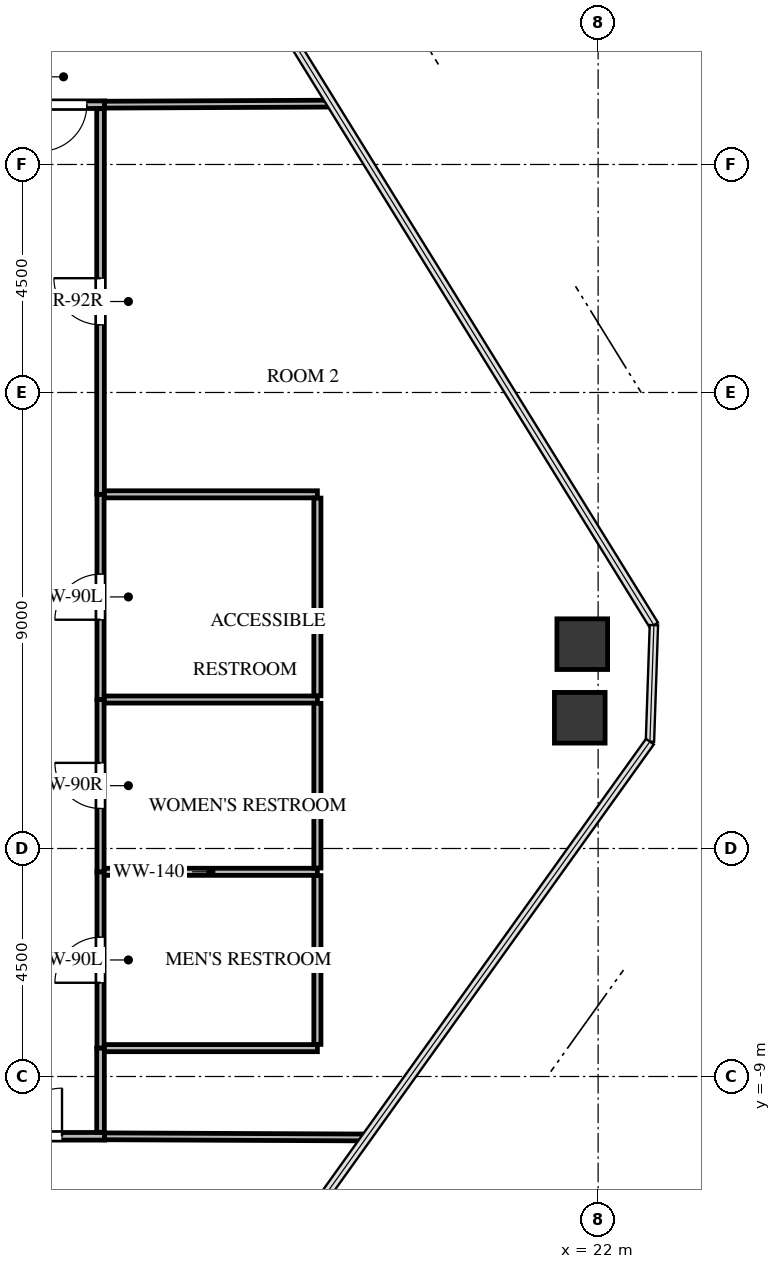
"""IFC4 building model, lengths in metres.
Left out: names, types, materials, properties, quantities, classifications, styles, units other than length and angle.
Written with IfcOpenShell. Run it as: python <this file> out.ifc"""

import sys

from ifc_helpers import new_model, si_unit, direction, frame, frame_2d, origin, origin_2d, place, context, subcontext, project, spatial, rectangle, extrude, source, transform, mapped, element, fill, save


model = new_model("IFC4")
c1 = context("Model", 3, precision=1e-05, world=origin(), true_north=direction((0.0, 1.0)))
c2 = subcontext(c1, "Body", "Model", "MODEL_VIEW")
j1 = project(units=[si_unit("LENGTHUNIT", "METRE"), si_unit("PLANEANGLEUNIT", "RADIAN")], contexts=[c1])
p1 = place(None, origin())
s1 = spatial("IfcSite", under=j1, at=p1, CompositionType="ELEMENT")
p2 = place(p1, origin())
s2 = spatial("IfcBuilding", under=s1, at=p2, CompositionType="ELEMENT")
p3 = place(p2, frame((0.0, 0.0, 190.3)))
s3 = spatial("IfcBuildingStorey", under=s2, at=p3, CompositionType="ELEMENT", Elevation=190.3)
m1 = source(origin(), c2, "Body", "SweptSolid", [
    extrude(rectangle(XDim=1.0, YDim=1.0, at=origin_2d()), origin(), (0.0, 0.0, 1.0), 3.3),
])
for number, where, z_axis, x_axis in (
    (1, (21.687, -0.467, -0.24), (0.0, 0.0, 1.0), (1.0, 0.0, 0.0)),
    (2, (21.638, -1.92, -0.24), (0.0, 0.0, 1.0), (1.0, 0.0, 0.0)),
):
    element("IfcColumn", number, at=place(p3, frame(where, z_axis=z_axis, x_axis=x_axis)), inside=s3, PredefinedType="COLUMN", context=c2, shape_type="MappedRepresentation", body=[
        mapped(m1, transform((0.0, 0.0, 0.0), x_axis=(1.0, 0.0, 0.0), y_axis=(0.0, 1.0, 0.0), z_axis=(0.0, 0.0, 1.0), scale=1.0)),
    ])
p4 = place(p3, frame((12.18, -8.44, 0.0), z_axis=(0.0, 0.0, 1.0), x_axis=(0.0, 1.0, 0.0)))
e3 = element("IfcWall", 3, at=p4, inside=s3, PredefinedType="PARTITIONING", context=c2, shape_type="SweptSolid", body=[
    extrude(rectangle(XDim=3.48, YDim=0.14, at=frame_2d((1.74, 0.0))), origin(), (0.0, 0.0, 1.0), 3.045),
])
p5 = place(p4, frame((1.29, 0.0, 0.0)))
e4 = element("IfcOpeningElement", 4, at=p5, cuts=e3, PredefinedType="OPENING", context=c2, shape_type="SweptSolid", body=[
    extrude(rectangle(XDim=0.9, YDim=2.05, at=frame_2d((0.45, 1.025))), frame((0.0, 0.08, 0.0), z_axis=(0.0, -1.0, 0.0), x_axis=(1.0, 0.0, 0.0)), (0.0, 0.0, 1.0), 0.16),
])
p6 = place(p3, frame((12.18, -4.96, 0.0), z_axis=(0.0, 0.0, 1.0), x_axis=(0.0, 1.0, 0.0)))
e5 = element("IfcWall", 5, at=p6, inside=s3, PredefinedType="PARTITIONING", context=c2, shape_type="SweptSolid", body=[
    extrude(rectangle(XDim=3.4, YDim=0.14, at=frame_2d((1.7, 0.0))), origin(), (0.0, 0.0, 1.0), 3.045),
])
p7 = place(p6, frame((1.25, 0.0, 0.0)))
e6 = element("IfcOpeningElement", 6, at=p7, cuts=e5, PredefinedType="OPENING", context=c2, shape_type="SweptSolid", body=[
    extrude(rectangle(XDim=0.9, YDim=2.05, at=frame_2d((0.45, 1.025))), frame((0.0, 0.08, 0.0), z_axis=(0.0, -1.0, 0.0), x_axis=(1.0, 0.0, 0.0)), (0.0, 0.0, 1.0), 0.16),
])
p8 = place(p3, frame((12.18, -1.56, 0.0), z_axis=(0.0, 0.0, 1.0), x_axis=(0.0, 1.0, 0.0)))
e7 = element("IfcWall", 7, at=p8, inside=s3, PredefinedType="PARTITIONING", context=c2, shape_type="SweptSolid", body=[
    extrude(rectangle(XDim=4.05, YDim=0.14, at=frame_2d((2.025, 0.0))), origin(), (0.0, 0.0, 1.0), 2.242),
])
p9 = place(p8, frame((1.575, 0.0, 0.0)))
e8 = element("IfcOpeningElement", 8, at=p9, cuts=e7, PredefinedType="OPENING", context=c2, shape_type="SweptSolid", body=[
    extrude(rectangle(XDim=0.9, YDim=2.05, at=frame_2d((0.45, 1.025))), frame((0.0, 0.08, 0.0), z_axis=(0.0, -1.0, 0.0), x_axis=(1.0, 0.0, 0.0)), (0.0, 0.0, 1.0), 0.16),
])
p10 = place(p3, frame((12.26, 10.18, 0.0), z_axis=(0.0, 0.0, 1.0), x_axis=(-1.0, 0.0, 0.0)))
e9 = element("IfcWall", 9, at=p10, inside=s3, PredefinedType="PARTITIONING", context=c2, shape_type="SweptSolid", body=[
    extrude(rectangle(XDim=6.72, YDim=0.15, at=frame_2d((3.36, 0.0))), origin(), (0.0, 0.0, 1.0), 2.242),
])
p11 = place(p10, frame((0.35, 0.0, 0.0)))
e10 = element("IfcOpeningElement", 10, at=p11, cuts=e9, PredefinedType="OPENING", context=c2, shape_type="SweptSolid", body=[
    extrude(rectangle(XDim=0.92, YDim=2.1, at=frame_2d((0.46, 1.05))), frame((0.0, 0.085, 0.0), z_axis=(0.0, -1.0, 0.0), x_axis=(1.0, 0.0, 0.0)), (0.0, 0.0, 1.0), 0.17),
])
p12 = place(p3, frame((9.04, -10.18, 0.0), z_axis=(0.0, 0.0, 1.0), x_axis=(1.0, 0.0, 0.0)))
e11 = element("IfcWall", 11, at=p12, inside=s3, PredefinedType="PARTITIONING", context=c2, shape_type="SweptSolid", body=[
    extrude(rectangle(XDim=3.22, YDim=0.15, at=frame_2d((1.61, 0.0))), origin(), (0.0, 0.0, 1.0), 3.045),
])
p13 = place(p12, frame((1.43, 0.0, 0.0)))
e12 = element("IfcOpeningElement", 12, at=p13, cuts=e11, PredefinedType="OPENING", context=c2, shape_type="SweptSolid", body=[
    extrude(rectangle(XDim=0.95, YDim=2.1, at=frame_2d((0.475, 1.05))), frame((0.0, 0.085, 0.0), z_axis=(0.0, -1.0, 0.0), x_axis=(1.0, 0.0, 0.0)), (0.0, 0.0, 1.0), 0.17),
])
p14 = place(p3, frame((12.18, 2.49, 0.0), z_axis=(0.0, 0.0, 1.0), x_axis=(0.0, 1.0, 0.0)))
e13 = element("IfcWall", 13, at=p14, inside=s3, PredefinedType="PARTITIONING", context=c2, shape_type="SweptSolid", body=[
    extrude(rectangle(XDim=7.611, YDim=0.15, at=frame_2d((3.806, 0.0))), origin(), (0.0, 0.0, 1.0), 3.045),
])
p15 = place(p14, frame((3.345, 0.0, 0.0)))
e14 = element("IfcOpeningElement", 14, at=p15, cuts=e13, PredefinedType="OPENING", context=c2, shape_type="SweptSolid", body=[
    extrude(rectangle(XDim=0.92, YDim=2.1, at=frame_2d((0.46, 1.05))), frame((0.0, 0.085, 0.0), z_axis=(0.0, -1.0, 0.0), x_axis=(1.0, 0.0, 0.0)), (0.0, 0.0, 1.0), 0.17),
])
p16 = place(p3, frame((12.18, -10.101, 0.0), z_axis=(0.0, 0.0, 1.0), x_axis=(0.0, 1.0, 0.0)))
e15 = element("IfcWall", 15, at=p16, inside=s3, PredefinedType="PARTITIONING", context=c2, shape_type="SweptSolid", body=[
    extrude(rectangle(XDim=1.661, YDim=0.15, at=frame_2d((0.831, 0.0))), origin(), (0.0, 0.0, 1.0), 3.045),
])
p17 = place(p3, frame((12.254, -4.96, 0.0), z_axis=(0.0, 0.0, 1.0), x_axis=(1.0, 0.0, 0.0)))
e16 = element("IfcWall", 16, at=p17, inside=s3, PredefinedType="PARTITIONING", context=c2, shape_type="SweptSolid", body=[
    extrude(rectangle(XDim=4.206, YDim=0.14, at=frame_2d((2.103, 0.0))), origin(), (0.0, 0.0, 1.0), 3.045),
])
p18 = place(p3, frame((16.46, -8.44, 0.0), z_axis=(0.0, 0.0, 1.0), x_axis=(-1.0, 0.0, 0.0)))
e17 = element("IfcWall", 17, at=p18, inside=s3, PredefinedType="PARTITIONING", context=c2, shape_type="SweptSolid", body=[
    extrude(rectangle(XDim=4.201, YDim=0.14, at=frame_2d((2.101, 0.0))), origin(), (0.0, 0.0, 1.0), 3.045),
])
p19 = place(p3, frame((16.46, -5.034, 0.0), z_axis=(0.0, 0.0, 1.0), x_axis=(0.0, -1.0, 0.0)))
e18 = element("IfcWall", 18, at=p19, inside=s3, PredefinedType="PARTITIONING", context=c2, shape_type="SweptSolid", body=[
    extrude(rectangle(XDim=3.332, YDim=0.14, at=frame_2d((1.666, 0.0))), origin(), (0.0, 0.0, 1.0), 3.045),
])
p20 = place(p3, frame((12.254, -1.56, 0.0), z_axis=(0.0, 0.0, 1.0), x_axis=(1.0, 0.0, 0.0)))
e19 = element("IfcWall", 19, at=p20, inside=s3, PredefinedType="PARTITIONING", context=c2, shape_type="SweptSolid", body=[
    extrude(rectangle(XDim=4.206, YDim=0.14, at=frame_2d((2.103, 0.0))), origin(), (0.0, 0.0, 1.0), 3.045),
])
p21 = place(p3, frame((16.46, -1.634, 0.0), z_axis=(0.0, 0.0, 1.0), x_axis=(0.0, -1.0, 0.0)))
e20 = element("IfcWall", 20, at=p21, inside=s3, PredefinedType="PARTITIONING", context=c2, shape_type="SweptSolid", body=[
    extrude(rectangle(XDim=3.252, YDim=0.14, at=frame_2d((1.626, 0.0))), origin(), (0.0, 0.0, 1.0), 3.045),
])
p22 = place(p3, frame((12.259, 2.49, 0.0), z_axis=(0.0, 0.0, 1.0), x_axis=(1.0, 0.0, 0.0)))
e21 = element("IfcWall", 21, at=p22, inside=s3, PredefinedType="PARTITIONING", context=c2, shape_type="SweptSolid", body=[
    extrude(rectangle(XDim=4.201, YDim=0.14, at=frame_2d((2.101, 0.0))), origin(), (0.0, 0.0, 1.0), 3.045),
])
p23 = place(p3, frame((16.46, 2.416, 0.0), z_axis=(0.0, 0.0, 1.0), x_axis=(0.0, -1.0, 0.0)))
e22 = element("IfcWall", 22, at=p23, inside=s3, PredefinedType="PARTITIONING", context=c2, shape_type="SweptSolid", body=[
    extrude(rectangle(XDim=3.902, YDim=0.14, at=frame_2d((1.951, 0.0))), origin(), (0.0, 0.0, 1.0), 2.242),
])
p24 = place(p3, frame((16.74, 10.201, 0.0), z_axis=(0.0, 0.0, 1.0), x_axis=(-0.999989522694, -0.004577608714, 0.0)))
e23 = element("IfcWall", 23, at=p24, inside=s3, PredefinedType="PARTITIONING", context=c2, shape_type="SweptSolid", body=[
    extrude(rectangle(XDim=4.48, YDim=0.135, at=frame_2d((2.24, 0.0))), origin(), (0.0, 0.0, 1.0), 2.399),
])
p25 = place(p3, frame((12.26, -10.18, 0.0), z_axis=(0.0, 0.0, 1.0), x_axis=(0.999990144117, -0.004439782427, 0.0)))
e24 = element("IfcWall", 24, at=p25, inside=s3, PredefinedType="PARTITIONING", context=c2, shape_type="SweptSolid", body=[
    extrude(rectangle(XDim=5.169, YDim=0.135, at=frame_2d((2.584, 0.0))), origin(), (0.0, 0.0, 1.0), 2.399),
])
m2 = source(origin(), c2, "Body", "SweptSolid", [
    extrude(rectangle(XDim=0.9, YDim=2.05, at=frame_2d((0.45, 1.025))), frame((0.0, 0.025, 0.0), z_axis=(0.0, -1.0, 0.0), x_axis=(1.0, 0.0, 0.0)), (0.0, 0.0, 1.0), 0.05),
])
p26 = place(p5, origin())
e25 = element("IfcDoor", 25, at=p26, inside=s3, OperationType="SINGLE_SWING_LEFT", PredefinedType="DOOR", context=c2, shape_type="MappedRepresentation", body=[
    mapped(m2, transform((0.0, 0.0, 0.0), x_axis=(1.0, 0.0, 0.0), y_axis=(0.0, 1.0, 0.0), z_axis=(0.0, 0.0, 1.0), scale=1.0)),
])
fill(e4, e25)
m3 = source(origin(), c2, "Body", "SweptSolid", [
    extrude(rectangle(XDim=0.9, YDim=2.05, at=frame_2d((0.45, 1.025))), frame((0.0, 0.025, 0.0), z_axis=(0.0, -1.0, 0.0), x_axis=(1.0, 0.0, 0.0)), (0.0, 0.0, 1.0), 0.05),
])
p27 = place(p7, origin())
e26 = element("IfcDoor", 26, at=p27, inside=s3, OperationType="SINGLE_SWING_RIGHT", PredefinedType="DOOR", context=c2, shape_type="MappedRepresentation", body=[
    mapped(m3, transform((0.0, 0.0, 0.0), x_axis=(1.0, 0.0, 0.0), y_axis=(0.0, 1.0, 0.0), z_axis=(0.0, 0.0, 1.0), scale=1.0)),
])
fill(e6, e26)
p28 = place(p9, origin())
e27 = element("IfcDoor", 27, at=p28, inside=s3, OperationType="SINGLE_SWING_LEFT", PredefinedType="DOOR", context=c2, shape_type="MappedRepresentation", body=[
    mapped(m2, transform((0.0, 0.0, 0.0), x_axis=(1.0, 0.0, 0.0), y_axis=(0.0, 1.0, 0.0), z_axis=(0.0, 0.0, 1.0), scale=1.0)),
])
fill(e8, e27)
m4 = source(origin(), c2, "Body", "SweptSolid", [
    extrude(rectangle(XDim=0.92, YDim=2.1, at=frame_2d((0.46, 1.05))), frame((0.0, 0.025, 0.0), z_axis=(0.0, -1.0, 0.0), x_axis=(1.0, 0.0, 0.0)), (0.0, 0.0, 1.0), 0.05),
])
p29 = place(p11, origin())
e28 = element("IfcDoor", 28, at=p29, inside=s3, OperationType="SINGLE_SWING_RIGHT", PredefinedType="DOOR", context=c2, shape_type="MappedRepresentation", body=[
    mapped(m4, transform((0.0, 0.0, 0.0), x_axis=(1.0, 0.0, 0.0), y_axis=(0.0, 1.0, 0.0), z_axis=(0.0, 0.0, 1.0), scale=1.0)),
])
fill(e10, e28)
m5 = source(origin(), c2, "Body", "SweptSolid", [
    extrude(rectangle(XDim=0.95, YDim=2.1, at=frame_2d((0.475, 1.05))), frame((0.0, 0.025, 0.0), z_axis=(0.0, -1.0, 0.0), x_axis=(1.0, 0.0, 0.0)), (0.0, 0.0, 1.0), 0.05),
])
p30 = place(p13, origin())
e29 = element("IfcDoor", 29, at=p30, inside=s3, OperationType="SINGLE_SWING_RIGHT", PredefinedType="DOOR", context=c2, shape_type="MappedRepresentation", body=[
    mapped(m5, transform((0.0, 0.0, 0.0), x_axis=(1.0, 0.0, 0.0), y_axis=(0.0, 1.0, 0.0), z_axis=(0.0, 0.0, 1.0), scale=1.0)),
])
fill(e12, e29)
p31 = place(p15, origin())
e30 = element("IfcDoor", 30, at=p31, inside=s3, OperationType="SINGLE_SWING_RIGHT", PredefinedType="DOOR", context=c2, shape_type="MappedRepresentation", body=[
    mapped(m4, transform((0.0, 0.0, 0.0), x_axis=(1.0, 0.0, 0.0), y_axis=(0.0, 1.0, 0.0), z_axis=(0.0, 0.0, 1.0), scale=1.0)),
])
fill(e14, e30)
save(model, sys.argv[1])
